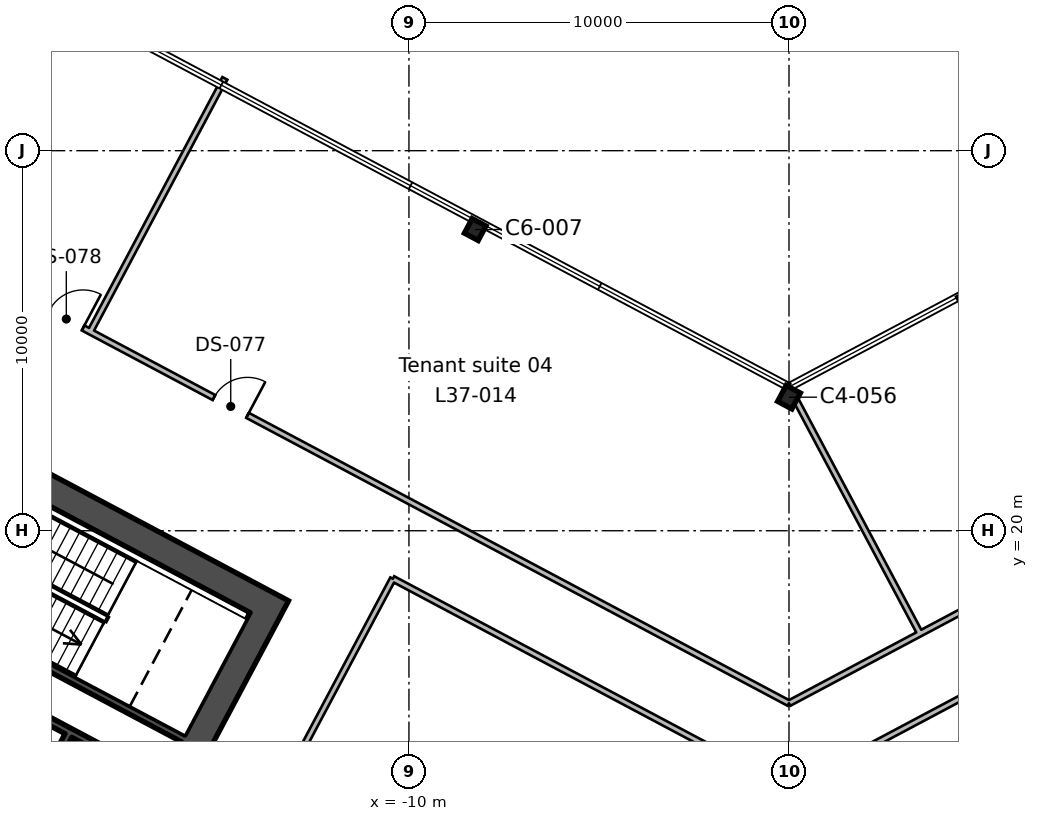
"""IFC4 building model, lengths in metres.
Left out: names, types, materials, properties, quantities, classifications, styles, units other than length and angle.
Written with IfcOpenShell. Run it as: python <this file> out.ifc"""

import sys

from ifc_helpers import new_model, si_unit, direction, frame, frame_2d, origin, origin_2d, place, context, subcontext, project, spatial, rectangle, i_section, extrude, element, fill, save


model = new_model("IFC4")
c1 = context("Model", 3, precision=1e-05, world=origin(), true_north=direction((0.0, 1.0)))
c2 = subcontext(c1, "Body", "Model", "MODEL_VIEW")
j1 = project(units=[si_unit("LENGTHUNIT", "METRE"), si_unit("PLANEANGLEUNIT", "RADIAN")], contexts=[c1])
p1 = place(None, origin())
s1 = spatial("IfcSite", under=j1, at=p1, CompositionType="ELEMENT")
p2 = place(p1, origin())
s2 = spatial("IfcBuilding", under=s1, at=p2, CompositionType="ELEMENT")
p3 = place(p2, frame((0.0, 0.0, 174.2)))
s3 = spatial("IfcBuildingStorey", under=s2, at=p3, CompositionType="ELEMENT", Elevation=174.2)
p4 = place(p3, frame((0.0, 23.514, 0.0), z_axis=(0.0, 0.0, 1.0), x_axis=(-0.882947592859, 0.469471562786, 0.0)))
e1 = element("IfcColumn", 1, at=p4, inside=s3, PredefinedType="COLUMN", context=c2, shape_type="SweptSolid", body=[
    extrude(i_section(OverallWidth=0.424, OverallDepth=0.475, WebThickness=0.048, FlangeThickness=0.077, FilletRadius=0.015, at=origin_2d()), origin(), (0.0, 0.0, 1.0), 4.0),
])
for number, where, z_axis, x_axis in (
    (2, (4.725, 26.047, 0.0), (0.0, 0.0, 1.0), (-0.883, -0.469, 0.0)),
    (3, (-8.257, 27.925, 0.0), (0.0, 0.0, 1.0), (-0.883, 0.469, 0.0)),
):
    element("IfcColumn", number, at=place(p3, frame(where, z_axis=z_axis, x_axis=x_axis)), inside=s3, PredefinedType="COLUMN", context=c2, shape_type="SweptSolid", body=[
        extrude(i_section(OverallWidth=0.412, OverallDepth=0.434, WebThickness=0.036, FlangeThickness=0.057, FilletRadius=0.015, at=origin_2d()), origin(), (0.0, 0.0, 1.0), 4.0),
    ])
p5 = place(p3, frame((-13.498, 18.333, 0.0), z_axis=(0.0, 0.0, 1.0), x_axis=(-0.469469918705, -0.88294846703, 0.0)))
e4 = element("IfcWall", 4, at=p5, inside=s3, PredefinedType="SHEAR", context=c2, shape_type="SweptSolid", body=[
    extrude(rectangle(XDim=19.7, YDim=0.75, at=frame_2d((9.85, 0.0))), origin(), (0.0, 0.0, 1.0), 4.0),
])
p6 = place(p5, frame((6.85, 0.0, 0.0)))
e5 = element("IfcOpeningElement", 5, at=p6, cuts=e4, PredefinedType="OPENING", context=c2, shape_type="SweptSolid", body=[
    extrude(rectangle(XDim=2.4, YDim=2.4, at=frame_2d((1.2, 1.2))), frame((0.0, 0.385, 0.0), z_axis=(0.0, -1.0, 0.0), x_axis=(1.0, 0.0, 0.0)), (0.0, 0.0, 1.0), 0.77),
])
p7 = place(p3, frame((-14.005, 18.178, 0.0), z_axis=(0.0, 0.0, 1.0), x_axis=(-0.88295010195, 0.469466843842, 0.0)))
e6 = element("IfcWall", 6, at=p7, inside=s3, PredefinedType="SHEAR", context=c2, shape_type="SweptSolid", body=[
    extrude(rectangle(XDim=20.2, YDim=0.75, at=frame_2d((10.1, 0.0))), origin(), (0.0, 0.0, 1.0), 4.0),
])
p8 = place(p3, frame((-18.96, 14.611, 0.0), z_axis=(0.0, 0.0, 1.0), x_axis=(-0.4694473164, -0.882960484464, 0.0)))
e7 = element("IfcWall", 7, at=p8, inside=s3, PredefinedType="SHEAR", context=c2, shape_type="SweptSolid", body=[
    extrude(rectangle(XDim=2.2, YDim=0.2, at=frame_2d((1.1, 0.0))), origin(), (0.0, 0.0, 1.0), 4.0),
])
p9 = place(p3, frame((-15.942, 14.536, 0.0), z_axis=(0.0, 0.0, 1.0), x_axis=(-0.882946947542, 0.469472776449, 0.0)))
e8 = element("IfcWall", 8, at=p9, inside=s3, PredefinedType="SHEAR", context=c2, shape_type="SweptSolid", body=[
    extrude(rectangle(XDim=8.0, YDim=0.2, at=frame_2d((4.0, 0.0))), origin(), (0.0, 0.0, 1.0), 4.0),
])
p10 = place(p3, frame((-16.529, 13.432, 0.0), z_axis=(0.0, 0.0, 1.0), x_axis=(-0.88295287151, 0.469461634952, 0.0)))
e9 = element("IfcWall", 9, at=p10, inside=s3, PredefinedType="SHEAR", context=c2, shape_type="SweptSolid", body=[
    extrude(rectangle(XDim=8.0, YDim=0.2, at=frame_2d((4.0, 0.0))), origin(), (0.0, 0.0, 1.0), 4.0),
])
p11 = place(p3, frame((-29.302, 31.04, 0.0), z_axis=(0.0, 0.0, 1.0), x_axis=(0.882948500672, -0.469469855433, 0.0)))
e10 = element("IfcWall", 10, at=p11, inside=s3, PredefinedType="PARTITIONING", context=c2, shape_type="SweptSolid", body=[
    extrude(rectangle(XDim=33.187, YDim=0.15, at=frame_2d((16.593, 0.0))), origin(), (0.0, 0.0, 1.0), 3.6),
])
p12 = place(p11, frame((16.05, 0.0, 0.0)))
e11 = element("IfcOpeningElement", 11, at=p12, cuts=e10, PredefinedType="OPENING", context=c2, shape_type="SweptSolid", body=[
    extrude(rectangle(XDim=1.0, YDim=2.1, at=frame_2d((0.5, 1.05))), frame((0.0, 0.085, 0.0), z_axis=(0.0, -1.0, 0.0), x_axis=(1.0, 0.0, 0.0)), (0.0, 0.0, 1.0), 0.17),
])
p13 = place(p11, frame((11.15, 0.0, 0.0)))
e12 = element("IfcOpeningElement", 12, at=p13, cuts=e10, PredefinedType="OPENING", context=c2, shape_type="SweptSolid", body=[
    extrude(rectangle(XDim=1.0, YDim=2.1, at=frame_2d((0.5, 1.05))), frame((0.0, 0.085, 0.0), z_axis=(0.0, -1.0, 0.0), x_axis=(1.0, 0.0, 0.0)), (0.0, 0.0, 1.0), 0.17),
])
p14 = place(p3, frame((0.0, 15.46, 0.0), z_axis=(0.0, 0.0, 1.0), x_axis=(0.882949722977, 0.469467556594, 0.0)))
e13 = element("IfcWall", 13, at=p14, inside=s3, PredefinedType="PARTITIONING", context=c2, shape_type="SweptSolid", body=[
    extrude(rectangle(XDim=20.021, YDim=0.15, at=frame_2d((10.01, 0.0))), origin(), (0.0, 0.0, 1.0), 3.6),
])
p15 = place(p14, frame((9.55, 0.0, 0.0)))
e14 = element("IfcOpeningElement", 14, at=p15, cuts=e13, PredefinedType="OPENING", context=c2, shape_type="SweptSolid", body=[
    extrude(rectangle(XDim=1.0, YDim=2.1, at=frame_2d((0.5, 1.05))), frame((0.0, 0.085, 0.0), z_axis=(0.0, -1.0, 0.0), x_axis=(1.0, 0.0, 0.0)), (0.0, 0.0, 1.0), 0.17),
])
p16 = place(p3, frame((-14.844, 31.903, 0.0), z_axis=(0.0, 0.0, 1.0), x_axis=(-0.469271860983, -0.883053747226, 0.0)))
e15 = element("IfcWall", 15, at=p16, inside=s3, PredefinedType="PARTITIONING", context=c2, shape_type="SweptSolid", body=[
    extrude(rectangle(XDim=7.55, YDim=0.15, at=frame_2d((3.775, 0.0))), origin(), (0.0, 0.0, 1.0), 3.6),
])
p17 = place(p3, frame((0.191, 23.422, 0.0), z_axis=(0.0, 0.0, 1.0), x_axis=(0.46954180368, -0.882910241529, 0.0)))
e16 = element("IfcWall", 16, at=p17, inside=s3, PredefinedType="PARTITIONING", context=c2, shape_type="SweptSolid", body=[
    extrude(rectangle(XDim=6.941, YDim=0.15, at=frame_2d((3.47, 0.0))), origin(), (0.0, 0.0, 1.0), 3.6),
])
p18 = place(p3, frame((-21.362, -1.836, 0.0), z_axis=(0.0, 0.0, 1.0), x_axis=(0.469442492633, 0.88296304912, 0.0)))
e17 = element("IfcWall", 17, at=p18, inside=s3, PredefinedType="PARTITIONING", context=c2, shape_type="SweptSolid", body=[
    extrude(rectangle(XDim=23.3, YDim=0.15, at=frame_2d((11.65, 0.0))), origin(), (0.0, 0.0, 1.0), 3.6),
])
p19 = place(p18, frame((11.15, 0.0, 0.0)))
e18 = element("IfcOpeningElement", 18, at=p19, cuts=e17, PredefinedType="OPENING", context=c2, shape_type="SweptSolid", body=[
    extrude(rectangle(XDim=1.0, YDim=2.1, at=frame_2d((0.5, 1.05))), frame((0.0, 0.085, 0.0), z_axis=(0.0, -1.0, 0.0), x_axis=(1.0, 0.0, 0.0)), (0.0, 0.0, 1.0), 0.17),
])
p20 = place(p3, frame((-10.424, 18.737, 0.0), z_axis=(0.0, 0.0, 1.0), x_axis=(0.88294579514, -0.469474943787, 0.0)))
e19 = element("IfcWall", 19, at=p20, inside=s3, PredefinedType="PARTITIONING", context=c2, shape_type="SweptSolid", body=[
    extrude(rectangle(XDim=10.942, YDim=0.15, at=frame_2d((5.471, 0.0))), origin(), (0.0, 0.0, 1.0), 3.6),
])
p21 = place(p3, frame((6.892, 16.859, 0.0), z_axis=(0.0, 0.0, 1.0), x_axis=(-0.882955833877, -0.469456063357, 0.0)))
e20 = element("IfcWall", 20, at=p21, inside=s3, PredefinedType="PARTITIONING", context=c2, shape_type="SweptSolid", body=[
    extrude(rectangle(XDim=6.942, YDim=0.15, at=frame_2d((3.471, 0.0))), origin(), (0.0, 0.0, 1.0), 3.6),
])
p22 = place(p12, origin())
e21 = element("IfcDoor", 21, at=p22, inside=s3, OperationType="SINGLE_SWING_RIGHT", PredefinedType="DOOR", context=c2, shape_type="SweptSolid", body=[
    extrude(rectangle(XDim=1.0, YDim=2.1, at=frame_2d((0.5, 1.05))), frame((0.0, 0.025, 0.0), z_axis=(0.0, -1.0, 0.0), x_axis=(1.0, 0.0, 0.0)), (0.0, 0.0, 1.0), 0.05),
])
fill(e11, e21)
p23 = place(p13, origin())
e22 = element("IfcDoor", 22, at=p23, inside=s3, OperationType="SINGLE_SWING_RIGHT", PredefinedType="DOOR", context=c2, shape_type="SweptSolid", body=[
    extrude(rectangle(XDim=1.0, YDim=2.1, at=frame_2d((0.5, 1.05))), frame((0.0, 0.025, 0.0), z_axis=(0.0, -1.0, 0.0), x_axis=(1.0, 0.0, 0.0)), (0.0, 0.0, 1.0), 0.05),
])
fill(e12, e22)
save(model, sys.argv[1])
